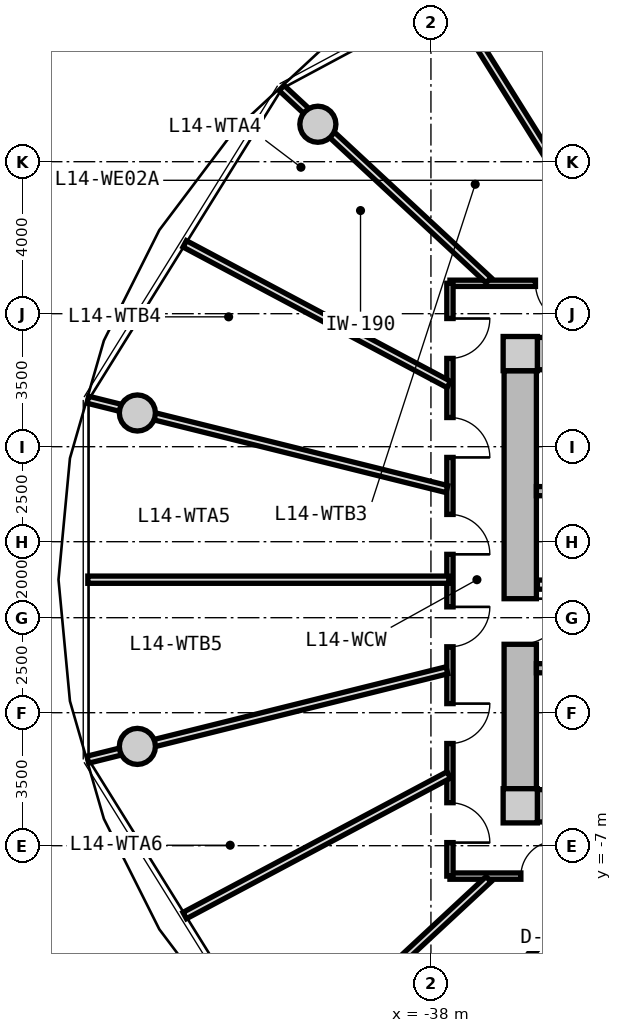
"""IFC4 building model, lengths in metres.
Left out: names, types, materials, properties, quantities, classifications, styles, units other than length and angle.
Written with IfcOpenShell. Run it as: python <this file> out.ifc"""

import sys

from ifc_helpers import new_model, si_unit, direction, frame, frame_2d, origin, origin_2d, place, context, subcontext, project, spatial, rectangle, circle, extrude, source, transform, mapped, element, fill, save


model = new_model("IFC4")
c1 = context("Model", 3, precision=1e-05, world=origin(), true_north=direction((0.0, 1.0)))
c2 = subcontext(c1, "Body", "Model", "MODEL_VIEW")
j1 = project(units=[si_unit("LENGTHUNIT", "METRE"), si_unit("PLANEANGLEUNIT", "RADIAN")], contexts=[c1])
p1 = place(None, origin())
s1 = spatial("IfcSite", under=j1, at=p1, CompositionType="ELEMENT")
p2 = place(p1, origin())
s2 = spatial("IfcBuilding", under=s1, at=p2, CompositionType="ELEMENT")
p3 = place(p2, frame((0.0, 0.0, 49.05)))
s3 = spatial("IfcBuildingStorey", under=s2, at=p3, CompositionType="ELEMENT", Elevation=49.05)
m1 = source(origin(), c2, "Body", "SweptSolid", [
    extrude(rectangle(XDim=0.9, YDim=0.9, at=origin_2d()), origin(), (0.0, 0.0, 1.0), 3.05),
])
for number, where, z_axis, x_axis in (
    (1, (-35.65, -5.95, 0.0), (0.0, 0.0, 1.0), (1.0, 0.0, 0.0)),
    (2, (-35.65, 5.95, 0.0), (0.0, 0.0, 1.0), (1.0, 0.0, 0.0)),
):
    element("IfcColumn", number, at=place(p3, frame(where, z_axis=z_axis, x_axis=x_axis)), inside=s3, PredefinedType="COLUMN", context=c2, shape_type="MappedRepresentation", body=[
        mapped(m1, transform((0.0, 0.0, 0.0), x_axis=(1.0, 0.0, 0.0), y_axis=(0.0, 1.0, 0.0), z_axis=(0.0, 0.0, 1.0), scale=1.0)),
    ])
m2 = source(origin(), c2, "Body", "SweptSolid", [
    extrude(rectangle(XDim=14.4, YDim=0.85, at=frame_2d((7.2, 0.0))), origin(), (0.0, 0.0, 1.0), 2.79),
])
for number, where, z_axis, x_axis in (
    (3, (-35.2, 5.95, 0.0), (0.0, 0.0, 1.0), (1.0, 0.0, 0.0)),
    (4, (-20.8, -5.95, 0.0), (0.0, 0.0, 1.0), (-1.0, 0.0, 0.0)),
):
    element("IfcWall", number, at=place(p3, frame(where, z_axis=z_axis, x_axis=x_axis)), inside=s3, PredefinedType="SHEAR", context=c2, shape_type="MappedRepresentation", body=[
        mapped(m2, transform((0.0, 0.0, 0.0), x_axis=(1.0, 0.0, 0.0), y_axis=(0.0, 1.0, 0.0), z_axis=(0.0, 0.0, 1.0), scale=1.0)),
    ])
m3 = source(origin(), c2, "Body", "SweptSolid", [
    extrude(rectangle(XDim=11.0, YDim=0.85, at=frame_2d((5.5, 0.0))), origin(), (0.0, 0.0, 1.0), 2.79),
])
p4 = place(p3, frame((-35.65, -5.5, 0.0), z_axis=(0.0, 0.0, 1.0), x_axis=(0.0, 1.0, 0.0)))
e5 = element("IfcWall", 5, at=p4, inside=s3, PredefinedType="SHEAR", context=c2, shape_type="MappedRepresentation", body=[
    mapped(m3, transform((0.0, 0.0, 0.0), x_axis=(1.0, 0.0, 0.0), y_axis=(0.0, 1.0, 0.0), z_axis=(0.0, 0.0, 1.0), scale=1.0)),
])
p5 = place(p4, frame((3.8, 0.0, 0.0)))
e6 = element("IfcOpeningElement", 6, at=p5, cuts=e5, PredefinedType="OPENING", context=c2, shape_type="SweptSolid", body=[
    extrude(rectangle(XDim=1.2, YDim=2.15, at=frame_2d((0.6, 1.075))), frame((0.0, 0.435, 0.0), z_axis=(0.0, -1.0, 0.0), x_axis=(1.0, 0.0, 0.0)), (0.0, 0.0, 1.0), 0.87),
])
m4 = source(origin(), c2, "Body", "SweptSolid", [
    extrude(circle(Radius=0.475, at=origin_2d()), origin(), (0.0, 0.0, 1.0), 3.05),
])
for number, where, z_axis, x_axis in (
    (7, (-40.975, 11.985, 0.0), (0.0, 0.0, 1.0), (1.0, 0.0, 0.0)),
    (8, (-45.725, 4.387, 0.0), (0.0, 0.0, 1.0), (1.0, 0.0, 0.0)),
    (9, (-45.725, -4.387, 0.0), (0.0, 0.0, 1.0), (1.0, 0.0, 0.0)),
):
    element("IfcColumn", number, at=place(p3, frame(where, z_axis=z_axis, x_axis=x_axis)), inside=s3, PredefinedType="COLUMN", context=c2, shape_type="MappedRepresentation", body=[
        mapped(m4, transform((0.0, 0.0, 0.0), x_axis=(1.0, 0.0, 0.0), y_axis=(0.0, 1.0, 0.0), z_axis=(0.0, 0.0, 1.0), scale=1.0)),
    ])
m5 = source(origin(), c2, "Body", "SweptSolid", [
    extrude(rectangle(XDim=7.765, YDim=0.24, at=frame_2d((3.883, 0.0))), origin(), (0.0, 0.0, 1.0), 2.79),
])
p6 = place(p3, frame((-35.225, 2.33, 0.0), z_axis=(0.0, 0.0, 1.0), x_axis=(1.0, 0.0, 0.0)))
e10 = element("IfcWall", 10, at=p6, inside=s3, PredefinedType="PARTITIONING", context=c2, shape_type="MappedRepresentation", body=[
    mapped(m5, transform((0.0, 0.0, 0.0), x_axis=(1.0, 0.0, 0.0), y_axis=(0.0, 1.0, 0.0), z_axis=(0.0, 0.0, 1.0), scale=1.0)),
])
p7 = place(p3, frame((-35.225, -2.33, 0.0), z_axis=(0.0, 0.0, 1.0), x_axis=(1.0, 0.0, 0.0)))
e11 = element("IfcWall", 11, at=p7, inside=s3, PredefinedType="PARTITIONING", context=c2, shape_type="MappedRepresentation", body=[
    mapped(m5, transform((0.0, 0.0, 0.0), x_axis=(1.0, 0.0, 0.0), y_axis=(0.0, 1.0, 0.0), z_axis=(0.0, 0.0, 1.0), scale=1.0)),
])
p8 = place(p7, frame((0.885, 0.0, 0.0)))
e12 = element("IfcOpeningElement", 12, at=p8, cuts=e11, PredefinedType="OPENING", context=c2, shape_type="SweptSolid", body=[
    extrude(rectangle(XDim=1.1, YDim=2.15, at=frame_2d((0.55, 1.075))), frame((0.0, 0.13, 0.0), z_axis=(0.0, -1.0, 0.0), x_axis=(1.0, 0.0, 0.0)), (0.0, 0.0, 1.0), 0.26),
])
m6 = source(origin(), c2, "Body", "SweptSolid", [
    extrude(rectangle(XDim=7.62, YDim=0.24, at=frame_2d((3.81, 0.0))), origin(), (0.0, 0.0, 1.0), 2.775),
])
p9 = place(p3, frame((-35.2, -0.13, 0.0), z_axis=(0.0, 0.0, 1.0), x_axis=(1.0, 0.0, 0.0)))
e13 = element("IfcWall", 13, at=p9, inside=s3, PredefinedType="PARTITIONING", context=c2, shape_type="MappedRepresentation", body=[
    mapped(m6, transform((0.0, 0.0, 0.0), x_axis=(1.0, 0.0, 0.0), y_axis=(0.0, 1.0, 0.0), z_axis=(0.0, 0.0, 1.0), scale=1.0)),
])
p10 = place(p9, frame((6.22, 0.0, 0.0)))
e14 = element("IfcOpeningElement", 14, at=p10, cuts=e13, PredefinedType="OPENING", context=c2, shape_type="SweptSolid", body=[
    extrude(rectangle(XDim=1.0, YDim=2.1, at=frame_2d((0.5, 1.05))), frame((0.0, 0.13, 0.0), z_axis=(0.0, -1.0, 0.0), x_axis=(1.0, 0.0, 0.0)), (0.0, 0.0, 1.0), 0.26),
])
p11 = place(p9, frame((0.85, 0.0, 0.0)))
e15 = element("IfcOpeningElement", 15, at=p11, cuts=e13, PredefinedType="OPENING", context=c2, shape_type="SweptSolid", body=[
    extrude(rectangle(XDim=1.1, YDim=2.2, at=frame_2d((0.55, 1.1))), frame((0.0, 0.13, 0.0), z_axis=(0.0, -1.0, 0.0), x_axis=(1.0, 0.0, 0.0)), (0.0, 0.0, 1.0), 0.26),
])
p12 = place(p9, frame((3.85, 0.0, 0.0)))
e16 = element("IfcOpeningElement", 16, at=p12, cuts=e13, PredefinedType="OPENING", context=c2, shape_type="SweptSolid", body=[
    extrude(rectangle(XDim=1.1, YDim=2.2, at=frame_2d((0.55, 1.1))), frame((0.0, 0.13, 0.0), z_axis=(0.0, -1.0, 0.0), x_axis=(1.0, 0.0, 0.0)), (0.0, 0.0, 1.0), 0.26),
])
m7 = source(origin(), c2, "Body", "SweptSolid", [
    extrude(rectangle(XDim=19.0, YDim=0.165, at=frame_2d((9.5, 0.0))), origin(), (0.0, 0.0, 1.0), 2.775),
])
p13 = place(p3, frame((-37.5, 7.8, 0.0), z_axis=(0.0, 0.0, 1.0), x_axis=(1.0, 0.0, 0.0)))
e17 = element("IfcWall", 17, at=p13, inside=s3, PredefinedType="PARTITIONING", context=c2, shape_type="MappedRepresentation", body=[
    mapped(m7, transform((0.0, 0.0, 0.0), x_axis=(1.0, 0.0, 0.0), y_axis=(0.0, 1.0, 0.0), z_axis=(0.0, 0.0, 1.0), scale=1.0)),
])
p14 = place(p13, frame((14.653, 0.0, 0.0)))
e18 = element("IfcOpeningElement", 18, at=p14, cuts=e17, PredefinedType="OPENING", context=c2, shape_type="SweptSolid", body=[
    extrude(rectangle(XDim=1.05, YDim=2.15, at=frame_2d((0.525, 1.075))), frame((0.0, 0.093, 0.0), z_axis=(0.0, -1.0, 0.0), x_axis=(1.0, 0.0, 0.0)), (0.0, 0.0, 1.0), 0.185),
])
p15 = place(p13, frame((12.5, 0.0, 0.0)))
e19 = element("IfcOpeningElement", 19, at=p15, cuts=e17, PredefinedType="OPENING", context=c2, shape_type="SweptSolid", body=[
    extrude(rectangle(XDim=1.05, YDim=2.15, at=frame_2d((0.525, 1.075))), frame((0.0, 0.093, 0.0), z_axis=(0.0, -1.0, 0.0), x_axis=(1.0, 0.0, 0.0)), (0.0, 0.0, 1.0), 0.185),
])
p16 = place(p13, frame((9.352, 0.0, 0.0)))
e20 = element("IfcOpeningElement", 20, at=p16, cuts=e17, PredefinedType="OPENING", context=c2, shape_type="SweptSolid", body=[
    extrude(rectangle(XDim=1.05, YDim=2.15, at=frame_2d((0.525, 1.075))), frame((0.0, 0.093, 0.0), z_axis=(0.0, -1.0, 0.0), x_axis=(1.0, 0.0, 0.0)), (0.0, 0.0, 1.0), 0.185),
])
p17 = place(p13, frame((7.806, 0.0, 0.0)))
e21 = element("IfcOpeningElement", 21, at=p17, cuts=e17, PredefinedType="OPENING", context=c2, shape_type="SweptSolid", body=[
    extrude(rectangle(XDim=1.05, YDim=2.15, at=frame_2d((0.525, 1.075))), frame((0.0, 0.093, 0.0), z_axis=(0.0, -1.0, 0.0), x_axis=(1.0, 0.0, 0.0)), (0.0, 0.0, 1.0), 0.185),
])
p18 = place(p13, frame((5.396, 0.0, 0.0)))
e22 = element("IfcOpeningElement", 22, at=p18, cuts=e17, PredefinedType="OPENING", context=c2, shape_type="SweptSolid", body=[
    extrude(rectangle(XDim=1.05, YDim=2.15, at=frame_2d((0.525, 1.075))), frame((0.0, 0.093, 0.0), z_axis=(0.0, -1.0, 0.0), x_axis=(1.0, 0.0, 0.0)), (0.0, 0.0, 1.0), 0.185),
])
p19 = place(p13, frame((2.251, 0.0, 0.0)))
e23 = element("IfcOpeningElement", 23, at=p19, cuts=e17, PredefinedType="OPENING", context=c2, shape_type="SweptSolid", body=[
    extrude(rectangle(XDim=1.05, YDim=2.15, at=frame_2d((0.525, 1.075))), frame((0.0, 0.093, 0.0), z_axis=(0.0, -1.0, 0.0), x_axis=(1.0, 0.0, 0.0)), (0.0, 0.0, 1.0), 0.185),
])
p20 = place(p3, frame((-18.5, -7.8, 0.0), z_axis=(0.0, 0.0, 1.0), x_axis=(-1.0, 0.0, 0.0)))
e24 = element("IfcWall", 24, at=p20, inside=s3, PredefinedType="PARTITIONING", context=c2, shape_type="MappedRepresentation", body=[
    mapped(m7, transform((0.0, 0.0, 0.0), x_axis=(1.0, 0.0, 0.0), y_axis=(0.0, 1.0, 0.0), z_axis=(0.0, 0.0, 1.0), scale=1.0)),
])
p21 = place(p20, frame((16.214, 0.0, 0.0)))
e25 = element("IfcOpeningElement", 25, at=p21, cuts=e24, PredefinedType="OPENING", context=c2, shape_type="SweptSolid", body=[
    extrude(rectangle(XDim=0.92, YDim=2.1, at=frame_2d((0.46, 1.05))), frame((0.0, 0.093, 0.0), z_axis=(0.0, -1.0, 0.0), x_axis=(1.0, 0.0, 0.0)), (0.0, 0.0, 1.0), 0.185),
])
p22 = place(p20, frame((13.063, 0.0, 0.0)))
e26 = element("IfcOpeningElement", 26, at=p22, cuts=e24, PredefinedType="OPENING", context=c2, shape_type="SweptSolid", body=[
    extrude(rectangle(XDim=0.92, YDim=2.1, at=frame_2d((0.46, 1.05))), frame((0.0, 0.093, 0.0), z_axis=(0.0, -1.0, 0.0), x_axis=(1.0, 0.0, 0.0)), (0.0, 0.0, 1.0), 0.185),
])
p23 = place(p20, frame((8.875, 0.0, 0.0)))
e27 = element("IfcOpeningElement", 27, at=p23, cuts=e24, PredefinedType="OPENING", context=c2, shape_type="SweptSolid", body=[
    extrude(rectangle(XDim=1.25, YDim=2.2, at=frame_2d((0.625, 1.1))), frame((0.0, 0.093, 0.0), z_axis=(0.0, -1.0, 0.0), x_axis=(1.0, 0.0, 0.0)), (0.0, 0.0, 1.0), 0.185),
])
p24 = place(p20, frame((3.506, 0.0, 0.0)))
e28 = element("IfcOpeningElement", 28, at=p24, cuts=e24, PredefinedType="OPENING", context=c2, shape_type="SweptSolid", body=[
    extrude(rectangle(XDim=1.25, YDim=2.2, at=frame_2d((0.625, 1.1))), frame((0.0, 0.093, 0.0), z_axis=(0.0, -1.0, 0.0), x_axis=(1.0, 0.0, 0.0)), (0.0, 0.0, 1.0), 0.185),
])
m8 = source(origin(), c2, "Body", "SweptSolid", [
    extrude(rectangle(XDim=15.6, YDim=0.165, at=frame_2d((7.8, 0.0))), origin(), (0.0, 0.0, 1.0), 2.775),
])
p25 = place(p3, frame((-37.5, -7.8, 0.0), z_axis=(0.0, 0.0, 1.0), x_axis=(0.0, 1.0, 0.0)))
e29 = element("IfcWall", 29, at=p25, inside=s3, PredefinedType="PARTITIONING", context=c2, shape_type="MappedRepresentation", body=[
    mapped(m8, transform((0.0, 0.0, 0.0), x_axis=(1.0, 0.0, 0.0), y_axis=(0.0, 1.0, 0.0), z_axis=(0.0, 0.0, 1.0), scale=1.0)),
])
p26 = place(p25, frame((13.623, 0.0, 0.0)))
e30 = element("IfcOpeningElement", 30, at=p26, cuts=e29, PredefinedType="OPENING", context=c2, shape_type="SweptSolid", body=[
    extrude(rectangle(XDim=1.05, YDim=2.15, at=frame_2d((0.525, 1.075))), frame((0.0, 0.093, 0.0), z_axis=(0.0, -1.0, 0.0), x_axis=(1.0, 0.0, 0.0)), (0.0, 0.0, 1.0), 0.185),
])
p27 = place(p25, frame((11.018, 0.0, 0.0)))
e31 = element("IfcOpeningElement", 31, at=p27, cuts=e29, PredefinedType="OPENING", context=c2, shape_type="SweptSolid", body=[
    extrude(rectangle(XDim=1.05, YDim=2.15, at=frame_2d((0.525, 1.075))), frame((0.0, 0.093, 0.0), z_axis=(0.0, -1.0, 0.0), x_axis=(1.0, 0.0, 0.0)), (0.0, 0.0, 1.0), 0.185),
])
p28 = place(p25, frame((8.467, 0.0, 0.0)))
e32 = element("IfcOpeningElement", 32, at=p28, cuts=e29, PredefinedType="OPENING", context=c2, shape_type="SweptSolid", body=[
    extrude(rectangle(XDim=1.05, YDim=2.15, at=frame_2d((0.525, 1.075))), frame((0.0, 0.093, 0.0), z_axis=(0.0, -1.0, 0.0), x_axis=(1.0, 0.0, 0.0)), (0.0, 0.0, 1.0), 0.185),
])
p29 = place(p25, frame((6.035, 0.0, 0.0)))
e33 = element("IfcOpeningElement", 33, at=p29, cuts=e29, PredefinedType="OPENING", context=c2, shape_type="SweptSolid", body=[
    extrude(rectangle(XDim=1.05, YDim=2.15, at=frame_2d((0.525, 1.075))), frame((0.0, 0.093, 0.0), z_axis=(0.0, -1.0, 0.0), x_axis=(1.0, 0.0, 0.0)), (0.0, 0.0, 1.0), 0.185),
])
p30 = place(p25, frame((3.489, 0.0, 0.0)))
e34 = element("IfcOpeningElement", 34, at=p30, cuts=e29, PredefinedType="OPENING", context=c2, shape_type="SweptSolid", body=[
    extrude(rectangle(XDim=1.05, YDim=2.15, at=frame_2d((0.525, 1.075))), frame((0.0, 0.093, 0.0), z_axis=(0.0, -1.0, 0.0), x_axis=(1.0, 0.0, 0.0)), (0.0, 0.0, 1.0), 0.185),
])
p31 = place(p25, frame((0.882, 0.0, 0.0)))
e35 = element("IfcOpeningElement", 35, at=p31, cuts=e29, PredefinedType="OPENING", context=c2, shape_type="SweptSolid", body=[
    extrude(rectangle(XDim=1.05, YDim=2.15, at=frame_2d((0.525, 1.075))), frame((0.0, 0.093, 0.0), z_axis=(0.0, -1.0, 0.0), x_axis=(1.0, 0.0, 0.0)), (0.0, 0.0, 1.0), 0.185),
])
m9 = source(origin(), c2, "Body", "SweptSolid", [
    extrude(rectangle(XDim=7.435, YDim=0.19, at=frame_2d((3.717, 0.0))), origin(), (0.0, 0.0, 1.0), 2.225),
])
p32 = place(p3, frame((-36.483, 7.88, 0.0), z_axis=(0.0, 0.0, 1.0), x_axis=(-0.732651956848, 0.680603489652, 0.0)))
e36 = element("IfcWall", 36, at=p32, inside=s3, PredefinedType="PARTITIONING", context=c2, shape_type="MappedRepresentation", body=[
    mapped(m9, transform((0.0, 0.0, 0.0), x_axis=(1.0, 0.0, 0.0), y_axis=(0.0, 1.0, 0.0), z_axis=(0.0, 0.0, 1.0), scale=1.0)),
])
m10 = source(origin(), c2, "Body", "SweptSolid", [
    extrude(rectangle(XDim=9.737, YDim=0.19, at=frame_2d((4.869, 0.0))), origin(), (0.0, 0.0, 1.0), 2.225),
])
p33 = place(p3, frame((-37.58, 2.385, 0.0), z_axis=(0.0, 0.0, 1.0), x_axis=(-0.970392716238, 0.241532557375, 0.0)))
e37 = element("IfcWall", 37, at=p33, inside=s3, PredefinedType="PARTITIONING", context=c2, shape_type="MappedRepresentation", body=[
    mapped(m10, transform((0.0, 0.0, 0.0), x_axis=(1.0, 0.0, 0.0), y_axis=(0.0, 1.0, 0.0), z_axis=(0.0, 0.0, 1.0), scale=1.0)),
])
m11 = source(origin(), c2, "Body", "SweptSolid", [
    extrude(rectangle(XDim=7.873, YDim=0.19, at=frame_2d((3.937, 0.0))), origin(), (0.0, 0.0, 1.0), 2.775),
])
p34 = place(p3, frame((-37.53, 5.138, 0.0), z_axis=(0.0, 0.0, 1.0), x_axis=(-0.882666052726, 0.470000680175, 0.0)))
e38 = element("IfcWall", 38, at=p34, inside=s3, PredefinedType="PARTITIONING", context=c2, shape_type="MappedRepresentation", body=[
    mapped(m11, transform((0.0, 0.0, 0.0), x_axis=(1.0, 0.0, 0.0), y_axis=(0.0, 1.0, 0.0), z_axis=(0.0, 0.0, 1.0), scale=1.0)),
])
p35 = place(p3, frame((-37.58, -2.385, 0.0), z_axis=(0.0, 0.0, 1.0), x_axis=(-0.970392716238, -0.241532557375, 0.0)))
e39 = element("IfcWall", 39, at=p35, inside=s3, PredefinedType="PARTITIONING", context=c2, shape_type="MappedRepresentation", body=[
    mapped(m10, transform((0.0, 0.0, 0.0), x_axis=(1.0, 0.0, 0.0), y_axis=(0.0, 1.0, 0.0), z_axis=(0.0, 0.0, 1.0), scale=1.0)),
])
m12 = source(origin(), c2, "Body", "SweptSolid", [
    extrude(rectangle(XDim=9.499, YDim=0.19, at=frame_2d((4.75, 0.0))), origin(), (0.0, 0.0, 1.0), 2.775),
])
p36 = place(p3, frame((-37.53, 0.0, 0.0), z_axis=(0.0, 0.0, 1.0), x_axis=(-1.0, 0.0, 0.0)))
e40 = element("IfcWall", 40, at=p36, inside=s3, PredefinedType="PARTITIONING", context=c2, shape_type="MappedRepresentation", body=[
    mapped(m12, transform((0.0, 0.0, 0.0), x_axis=(1.0, 0.0, 0.0), y_axis=(0.0, 1.0, 0.0), z_axis=(0.0, 0.0, 1.0), scale=1.0)),
])
p37 = place(p3, frame((-36.483, -7.88, 0.0), z_axis=(0.0, 0.0, 1.0), x_axis=(-0.732651956848, -0.680603489652, 0.0)))
e41 = element("IfcWall", 41, at=p37, inside=s3, PredefinedType="PARTITIONING", context=c2, shape_type="MappedRepresentation", body=[
    mapped(m9, transform((0.0, 0.0, 0.0), x_axis=(1.0, 0.0, 0.0), y_axis=(0.0, 1.0, 0.0), z_axis=(0.0, 0.0, 1.0), scale=1.0)),
])
p38 = place(p3, frame((-37.53, -5.138, 0.0), z_axis=(0.0, 0.0, 1.0), x_axis=(-0.882666052726, -0.470000680175, 0.0)))
e42 = element("IfcWall", 42, at=p38, inside=s3, PredefinedType="PARTITIONING", context=c2, shape_type="MappedRepresentation", body=[
    mapped(m11, transform((0.0, 0.0, 0.0), x_axis=(1.0, 0.0, 0.0), y_axis=(0.0, 1.0, 0.0), z_axis=(0.0, 0.0, 1.0), scale=1.0)),
])
m13 = source(origin(), c2, "Body", "SweptSolid", [
    extrude(rectangle(XDim=8.436, YDim=0.14, at=frame_2d((4.218, 0.0))), origin(), (0.0, 0.0, 1.0), 2.775),
])
p39 = place(p3, frame((-33.828, -7.83, 0.0), z_axis=(0.0, 0.0, 1.0), x_axis=(-0.604486552388, -0.796615345058, 0.0)))
e43 = element("IfcWall", 43, at=p39, inside=s3, PredefinedType="PARTITIONING", context=c2, shape_type="MappedRepresentation", body=[
    mapped(m13, transform((0.0, 0.0, 0.0), x_axis=(1.0, 0.0, 0.0), y_axis=(0.0, 1.0, 0.0), z_axis=(0.0, 0.0, 1.0), scale=1.0)),
])
m14 = source(origin(), c2, "Body", "SweptSolid", [
    extrude(rectangle(XDim=8.818, YDim=0.19, at=frame_2d((4.409, 0.0))), origin(), (0.0, 0.0, 1.0), 2.775),
])
p40 = place(p3, frame((-32.841, 7.83, 0.0), z_axis=(0.0, 0.0, 1.0), x_axis=(-0.529931746109, 0.848040296487, 0.0)))
e44 = element("IfcWall", 44, at=p40, inside=s3, PredefinedType="PARTITIONING", context=c2, shape_type="MappedRepresentation", body=[
    mapped(m14, transform((0.0, 0.0, 0.0), x_axis=(1.0, 0.0, 0.0), y_axis=(0.0, 1.0, 0.0), z_axis=(0.0, 0.0, 1.0), scale=1.0)),
])
m15 = source(origin(), c2, "Body", "SweptSolid", [
    extrude(rectangle(XDim=1.2, YDim=2.15, at=frame_2d((0.6, 1.075))), frame((0.0, 0.025, 0.0), z_axis=(0.0, -1.0, 0.0), x_axis=(1.0, 0.0, 0.0)), (0.0, 0.0, 1.0), 0.05),
])
p41 = place(p5, frame((1.2, 0.0, 0.0), z_axis=(0.0, 0.0, 1.0), x_axis=(-1.0, 0.0, 0.0)))
e45 = element("IfcDoor", 45, at=p41, inside=s3, OperationType="SINGLE_SWING_LEFT", PredefinedType="DOOR", context=c2, shape_type="MappedRepresentation", body=[
    mapped(m15, transform((0.0, 0.0, 0.0), x_axis=(1.0, 0.0, 0.0), y_axis=(0.0, 1.0, 0.0), z_axis=(0.0, 0.0, 1.0), scale=1.0)),
])
fill(e6, e45)
m16 = source(origin(), c2, "Body", "SweptSolid", [
    extrude(rectangle(XDim=1.05, YDim=2.15, at=frame_2d((0.525, 1.075))), frame((0.0, 0.025, 0.0), z_axis=(0.0, -1.0, 0.0), x_axis=(1.0, 0.0, 0.0)), (0.0, 0.0, 1.0), 0.05),
])
p42 = place(p26, frame((1.05, 0.0, 0.0), z_axis=(0.0, 0.0, 1.0), x_axis=(-1.0, 0.0, 0.0)))
e46 = element("IfcDoor", 46, at=p42, inside=s3, OperationType="SINGLE_SWING_LEFT", PredefinedType="DOOR", context=c2, shape_type="MappedRepresentation", body=[
    mapped(m16, transform((0.0, 0.0, 0.0), x_axis=(1.0, 0.0, 0.0), y_axis=(0.0, 1.0, 0.0), z_axis=(0.0, 0.0, 1.0), scale=1.0)),
])
fill(e30, e46)
p43 = place(p27, frame((1.05, 0.0, 0.0), z_axis=(0.0, 0.0, 1.0), x_axis=(-1.0, 0.0, 0.0)))
e47 = element("IfcDoor", 47, at=p43, inside=s3, OperationType="SINGLE_SWING_RIGHT", PredefinedType="DOOR", context=c2, shape_type="MappedRepresentation", body=[
    mapped(m16, transform((0.0, 0.0, 0.0), x_axis=(1.0, 0.0, 0.0), y_axis=(0.0, 1.0, 0.0), z_axis=(0.0, 0.0, 1.0), scale=1.0)),
])
fill(e31, e47)
p44 = place(p28, frame((1.05, 0.0, 0.0), z_axis=(0.0, 0.0, 1.0), x_axis=(-1.0, 0.0, 0.0)))
e48 = element("IfcDoor", 48, at=p44, inside=s3, OperationType="SINGLE_SWING_RIGHT", PredefinedType="DOOR", context=c2, shape_type="MappedRepresentation", body=[
    mapped(m16, transform((0.0, 0.0, 0.0), x_axis=(1.0, 0.0, 0.0), y_axis=(0.0, 1.0, 0.0), z_axis=(0.0, 0.0, 1.0), scale=1.0)),
])
fill(e32, e48)
p45 = place(p29, frame((1.05, 0.0, 0.0), z_axis=(0.0, 0.0, 1.0), x_axis=(-1.0, 0.0, 0.0)))
e49 = element("IfcDoor", 49, at=p45, inside=s3, OperationType="SINGLE_SWING_LEFT", PredefinedType="DOOR", context=c2, shape_type="MappedRepresentation", body=[
    mapped(m16, transform((0.0, 0.0, 0.0), x_axis=(1.0, 0.0, 0.0), y_axis=(0.0, 1.0, 0.0), z_axis=(0.0, 0.0, 1.0), scale=1.0)),
])
fill(e33, e49)
p46 = place(p30, frame((1.05, 0.0, 0.0), z_axis=(0.0, 0.0, 1.0), x_axis=(-1.0, 0.0, 0.0)))
e50 = element("IfcDoor", 50, at=p46, inside=s3, OperationType="SINGLE_SWING_LEFT", PredefinedType="DOOR", context=c2, shape_type="MappedRepresentation", body=[
    mapped(m16, transform((0.0, 0.0, 0.0), x_axis=(1.0, 0.0, 0.0), y_axis=(0.0, 1.0, 0.0), z_axis=(0.0, 0.0, 1.0), scale=1.0)),
])
fill(e34, e50)
p47 = place(p31, frame((1.05, 0.0, 0.0), z_axis=(0.0, 0.0, 1.0), x_axis=(-1.0, 0.0, 0.0)))
e51 = element("IfcDoor", 51, at=p47, inside=s3, OperationType="SINGLE_SWING_RIGHT", PredefinedType="DOOR", context=c2, shape_type="MappedRepresentation", body=[
    mapped(m16, transform((0.0, 0.0, 0.0), x_axis=(1.0, 0.0, 0.0), y_axis=(0.0, 1.0, 0.0), z_axis=(0.0, 0.0, 1.0), scale=1.0)),
])
fill(e35, e51)
m17 = source(origin(), c2, "Body", "SweptSolid", [
    extrude(rectangle(XDim=0.92, YDim=2.1, at=frame_2d((0.46, 1.05))), frame((0.0, 0.025, 0.0), z_axis=(0.0, -1.0, 0.0), x_axis=(1.0, 0.0, 0.0)), (0.0, 0.0, 1.0), 0.05),
])
p48 = place(p21, frame((0.92, 0.0, 0.0), z_axis=(0.0, 0.0, 1.0), x_axis=(-1.0, 0.0, 0.0)))
e52 = element("IfcDoor", 52, at=p48, inside=s3, OperationType="SINGLE_SWING_RIGHT", PredefinedType="DOOR", context=c2, shape_type="MappedRepresentation", body=[
    mapped(m17, transform((0.0, 0.0, 0.0), x_axis=(1.0, 0.0, 0.0), y_axis=(0.0, 1.0, 0.0), z_axis=(0.0, 0.0, 1.0), scale=1.0)),
])
fill(e25, e52)
p49 = place(p19, frame((1.05, 0.0, 0.0), z_axis=(0.0, 0.0, 1.0), x_axis=(-1.0, 0.0, 0.0)))
e53 = element("IfcDoor", 53, at=p49, inside=s3, OperationType="SINGLE_SWING_LEFT", PredefinedType="DOOR", context=c2, shape_type="MappedRepresentation", body=[
    mapped(m16, transform((0.0, 0.0, 0.0), x_axis=(1.0, 0.0, 0.0), y_axis=(0.0, 1.0, 0.0), z_axis=(0.0, 0.0, 1.0), scale=1.0)),
])
fill(e23, e53)
save(model, sys.argv[1])
